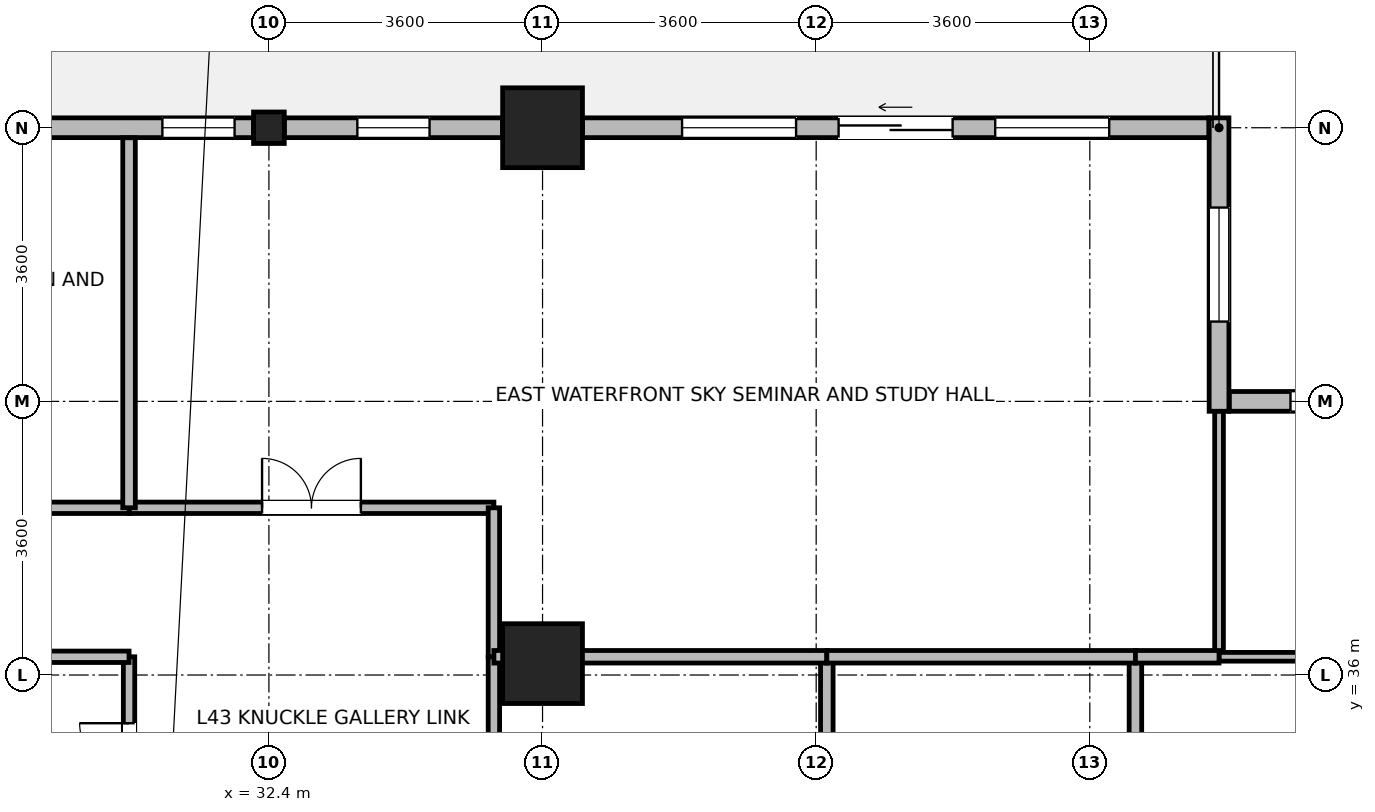
"""IFC4 building model, lengths in metres.
Left out: names, types, materials, properties, quantities, classifications, styles, units other than length and angle.
Written with IfcOpenShell. Run it as: python <this file> out.ifc"""

import sys

from ifc_helpers import new_model, si_unit, direction, frame, frame_2d, origin, origin_2d, place, context, subcontext, project, spatial, rectangle, i_section, extrude, source, transform, mapped, element, fill, save


model = new_model("IFC4")
c1 = context("Model", 3, precision=1e-05, world=origin(), true_north=direction((0.0, 1.0)))
c2 = subcontext(c1, "Body", "Model", "MODEL_VIEW")
j1 = project(units=[si_unit("LENGTHUNIT", "METRE"), si_unit("PLANEANGLEUNIT", "RADIAN")], contexts=[c1])
p1 = place(None, origin())
s1 = spatial("IfcSite", under=j1, at=p1, CompositionType="ELEMENT")
p2 = place(p1, origin())
s2 = spatial("IfcBuilding", under=s1, at=p2, CompositionType="ELEMENT")
p3 = place(p2, frame((0.0, 0.0, 169.8)))
s3 = spatial("IfcBuildingStorey", under=s2, at=p3, CompositionType="ELEMENT", Elevation=169.8)
m1 = source(origin(), c2, "Body", "SweptSolid", [
    extrude(rectangle(XDim=1.05, YDim=1.05, at=origin_2d()), origin(), (0.0, 0.0, 1.0), 3.7),
])
for number, where, z_axis, x_axis in (
    (1, (36.0, 43.2, 0.0), (0.0, 0.0, 1.0), (1.0, 0.0, 0.0)),
    (2, (36.0, 36.15, 0.0), (0.0, 0.0, 1.0), (1.0, 0.0, 0.0)),
):
    element("IfcColumn", number, at=place(p3, frame(where, z_axis=z_axis, x_axis=x_axis)), inside=s3, PredefinedType="COLUMN", context=c2, shape_type="MappedRepresentation", body=[
        mapped(m1, transform((0.0, 0.0, 0.0), x_axis=(1.0, 0.0, 0.0), y_axis=(0.0, 1.0, 0.0), z_axis=(0.0, 0.0, 1.0), scale=1.0)),
    ])
m2 = source(origin(), c2, "Body", "SweptSolid", [
    extrude(i_section(OverallWidth=0.404, OverallDepth=0.414, WebThickness=0.021, FlangeThickness=0.028, FilletRadius=0.015, at=origin_2d()), origin(), (0.0, 0.0, 1.0), 3.7),
])
p4 = place(p3, frame((32.4, 43.2, 0.0), z_axis=(0.0, 0.0, 1.0), x_axis=(1.0, 0.0, 0.0)))
e3 = element("IfcColumn", 3, at=p4, inside=s3, PredefinedType="COLUMN", context=c2, shape_type="MappedRepresentation", body=[
    mapped(m2, transform((0.0, 0.0, 0.0), x_axis=(1.0, 0.0, 0.0), y_axis=(0.0, 1.0, 0.0), z_axis=(0.0, 0.0, 1.0), scale=1.0)),
])
p5 = place(p3, frame((45.035, 39.6, 0.0), z_axis=(0.0, 0.0, 1.0), x_axis=(1.0, 0.0, 0.0)))
e4 = element("IfcWall", 4, at=p5, inside=s3, PredefinedType="STANDARD", context=c2, shape_type="SweptSolid", body=[
    extrude(rectangle(XDim=9.33, YDim=0.26, at=frame_2d((4.665, 0.0))), origin(), (0.0, 0.0, 1.0), 3.44),
])
p6 = place(p5, frame((0.805, 0.0, 0.85)))
e5 = element("IfcOpeningElement", 5, at=p6, cuts=e4, PredefinedType="OPENING", context=c2, shape_type="SweptSolid", body=[
    extrude(rectangle(XDim=1.5, YDim=1.85, at=frame_2d((0.75, 0.925))), frame((0.0, 0.14, 0.0), z_axis=(0.0, -1.0, 0.0), x_axis=(1.0, 0.0, 0.0)), (0.0, 0.0, 1.0), 0.28),
])
p7 = place(p5, frame((3.915, 0.0, 0.85)))
e6 = element("IfcOpeningElement", 6, at=p7, cuts=e4, PredefinedType="OPENING", context=c2, shape_type="SweptSolid", body=[
    extrude(rectangle(XDim=1.5, YDim=1.85, at=frame_2d((0.75, 0.925))), frame((0.0, 0.14, 0.0), z_axis=(0.0, -1.0, 0.0), x_axis=(1.0, 0.0, 0.0)), (0.0, 0.0, 1.0), 0.28),
])
p8 = place(p5, frame((7.025, 0.0, 0.85)))
e7 = element("IfcOpeningElement", 7, at=p8, cuts=e4, PredefinedType="OPENING", context=c2, shape_type="SweptSolid", body=[
    extrude(rectangle(XDim=1.5, YDim=1.85, at=frame_2d((0.75, 0.925))), frame((0.0, 0.14, 0.0), z_axis=(0.0, -1.0, 0.0), x_axis=(1.0, 0.0, 0.0)), (0.0, 0.0, 1.0), 0.28),
])
p9 = place(p3, frame((44.9, 43.33, 0.0), z_axis=(0.0, 0.0, 1.0), x_axis=(0.0, -1.0, 0.0)))
e8 = element("IfcWall", 8, at=p9, inside=s3, PredefinedType="STANDARD", context=c2, shape_type="SweptSolid", body=[
    extrude(rectangle(XDim=3.86, YDim=0.26, at=frame_2d((1.93, 0.0))), origin(), (0.0, 0.0, 1.0), 3.44),
])
p10 = place(p9, frame((1.18, 0.0, 0.85)))
e9 = element("IfcOpeningElement", 9, at=p10, cuts=e8, PredefinedType="OPENING", context=c2, shape_type="SweptSolid", body=[
    extrude(rectangle(XDim=1.5, YDim=1.85, at=frame_2d((0.75, 0.925))), frame((0.0, 0.14, 0.0), z_axis=(0.0, -1.0, 0.0), x_axis=(1.0, 0.0, 0.0)), (0.0, 0.0, 1.0), 0.28),
])
p11 = place(p3, frame((36.526, 43.2, 0.0), z_axis=(0.0, 0.0, 1.0), x_axis=(1.0, 0.0, 0.0)))
e10 = element("IfcWall", 10, at=p11, inside=s3, PredefinedType="STANDARD", context=c2, shape_type="SweptSolid", body=[
    extrude(rectangle(XDim=8.239, YDim=0.26, at=frame_2d((4.12, 0.0))), origin(), (0.0, 0.0, 1.0), 2.99),
])
p12 = place(p11, frame((3.369, 0.0, 0.0)))
e11 = element("IfcOpeningElement", 11, at=p12, cuts=e10, PredefinedType="OPENING", context=c2, shape_type="SweptSolid", body=[
    extrude(rectangle(XDim=1.5, YDim=2.15, at=frame_2d((0.75, 1.075))), frame((0.0, 0.14, 0.0), z_axis=(0.0, -1.0, 0.0), x_axis=(1.0, 0.0, 0.0)), (0.0, 0.0, 1.0), 0.28),
])
p13 = place(p11, frame((1.31, 0.0, 0.85)))
e12 = element("IfcOpeningElement", 12, at=p13, cuts=e10, PredefinedType="OPENING", context=c2, shape_type="SweptSolid", body=[
    extrude(rectangle(XDim=1.5, YDim=1.85, at=frame_2d((0.75, 0.925))), frame((0.0, 0.14, 0.0), z_axis=(0.0, -1.0, 0.0), x_axis=(1.0, 0.0, 0.0)), (0.0, 0.0, 1.0), 0.28),
])
p14 = place(p11, frame((5.429, 0.0, 0.85)))
e13 = element("IfcOpeningElement", 13, at=p14, cuts=e10, PredefinedType="OPENING", context=c2, shape_type="SweptSolid", body=[
    extrude(rectangle(XDim=1.5, YDim=1.85, at=frame_2d((0.75, 0.925))), frame((0.0, 0.14, 0.0), z_axis=(0.0, -1.0, 0.0), x_axis=(1.0, 0.0, 0.0)), (0.0, 0.0, 1.0), 0.28),
])
p15 = place(p3, frame((32.603, 43.2, 0.0), z_axis=(0.0, 0.0, 1.0), x_axis=(1.0, 0.0, 0.0)))
e14 = element("IfcWall", 14, at=p15, inside=s3, PredefinedType="STANDARD", context=c2, shape_type="SweptSolid", body=[
    extrude(rectangle(XDim=2.871, YDim=0.26, at=frame_2d((1.436, 0.0))), origin(), (0.0, 0.0, 1.0), 2.99),
])
p16 = place(p15, frame((0.96, 0.0, 0.85)))
e15 = element("IfcOpeningElement", 15, at=p16, cuts=e14, PredefinedType="OPENING", context=c2, shape_type="SweptSolid", body=[
    extrude(rectangle(XDim=0.95, YDim=1.75, at=frame_2d((0.475, 0.875))), frame((0.0, 0.14, 0.0), z_axis=(0.0, -1.0, 0.0), x_axis=(1.0, 0.0, 0.0)), (0.0, 0.0, 1.0), 0.28),
])
p17 = place(p3, frame((29.326, 43.2, 0.0), z_axis=(0.0, 0.0, 1.0), x_axis=(1.0, 0.0, 0.0)))
e16 = element("IfcWall", 16, at=p17, inside=s3, PredefinedType="STANDARD", context=c2, shape_type="SweptSolid", body=[
    extrude(rectangle(XDim=2.871, YDim=0.26, at=frame_2d((1.436, 0.0))), origin(), (0.0, 0.0, 1.0), 2.99),
])
p18 = place(p17, frame((1.673, 0.0, 0.85)))
e17 = element("IfcOpeningElement", 17, at=p18, cuts=e16, PredefinedType="OPENING", context=c2, shape_type="SweptSolid", body=[
    extrude(rectangle(XDim=0.95, YDim=1.75, at=frame_2d((0.475, 0.875))), frame((0.0, 0.14, 0.0), z_axis=(0.0, -1.0, 0.0), x_axis=(1.0, 0.0, 0.0)), (0.0, 0.0, 1.0), 0.28),
])
p19 = place(p3, frame((35.36, 28.56, 0.0), z_axis=(0.0, 0.0, 1.0), x_axis=(0.0, 1.0, 0.0)))
e18 = element("IfcWall", 18, at=p19, inside=s3, PredefinedType="PARTITIONING", context=c2, shape_type="SweptSolid", body=[
    extrude(rectangle(XDim=7.68, YDim=0.15, at=frame_2d((3.84, 0.0))), origin(), (0.0, 0.0, 1.0), 3.44),
])
p20 = place(p19, frame((3.19, 0.0, 0.0)))
e19 = element("IfcOpeningElement", 19, at=p20, cuts=e18, PredefinedType="OPENING", context=c2, shape_type="SweptSolid", body=[
    extrude(rectangle(XDim=1.3, YDim=2.12, at=frame_2d((0.65, 1.06))), frame((0.0, 0.085, 0.0), z_axis=(0.0, -1.0, 0.0), x_axis=(1.0, 0.0, 0.0)), (0.0, 0.0, 1.0), 0.17),
])
p21 = place(p3, frame((30.56, 38.2, 0.0), z_axis=(0.0, 0.0, 1.0), x_axis=(1.0, 0.0, 0.0)))
e20 = element("IfcWall", 20, at=p21, inside=s3, PredefinedType="PARTITIONING", context=c2, shape_type="SweptSolid", body=[
    extrude(rectangle(XDim=4.8, YDim=0.15, at=frame_2d((2.4, 0.0))), origin(), (0.0, 0.0, 1.0), 3.44),
])
p22 = place(p21, frame((1.75, 0.0, 0.0)))
e21 = element("IfcOpeningElement", 21, at=p22, cuts=e20, PredefinedType="OPENING", context=c2, shape_type="SweptSolid", body=[
    extrude(rectangle(XDim=1.3, YDim=2.12, at=frame_2d((0.65, 1.06))), frame((0.0, 0.085, 0.0), z_axis=(0.0, -1.0, 0.0), x_axis=(1.0, 0.0, 0.0)), (0.0, 0.0, 1.0), 0.17),
])
p23 = place(p3, frame((25.82, 38.2, 0.0), z_axis=(0.0, 0.0, 1.0), x_axis=(1.0, 0.0, 0.0)))
e22 = element("IfcWall", 22, at=p23, inside=s3, PredefinedType="PARTITIONING", context=c2, shape_type="SweptSolid", body=[
    extrude(rectangle(XDim=4.74, YDim=0.15, at=frame_2d((2.37, 0.0))), origin(), (0.0, 0.0, 1.0), 3.44),
])
p24 = place(p23, frame((1.92, 0.0, 0.0)))
e23 = element("IfcOpeningElement", 23, at=p24, cuts=e22, PredefinedType="OPENING", context=c2, shape_type="SweptSolid", body=[
    extrude(rectangle(XDim=0.9, YDim=2.08, at=frame_2d((0.45, 1.04))), frame((0.0, 0.085, 0.0), z_axis=(0.0, -1.0, 0.0), x_axis=(1.0, 0.0, 0.0)), (0.0, 0.0, 1.0), 0.17),
])
p25 = place(p3, frame((30.56, 33.7, 0.0), z_axis=(0.0, 0.0, 1.0), x_axis=(0.0, 1.0, 0.0)))
e24 = element("IfcWall", 24, at=p25, inside=s3, PredefinedType="PARTITIONING", context=c2, shape_type="SweptSolid", body=[
    extrude(rectangle(XDim=2.54, YDim=0.15, at=frame_2d((1.27, 0.0))), origin(), (0.0, 0.0, 1.0), 3.44),
])
p26 = place(p25, frame((0.366, 0.0, 0.0)))
e25 = element("IfcOpeningElement", 25, at=p26, cuts=e24, PredefinedType="OPENING", context=c2, shape_type="SweptSolid", body=[
    extrude(rectangle(XDim=1.3, YDim=2.12, at=frame_2d((0.65, 1.06))), frame((0.0, 0.085, 0.0), z_axis=(0.0, -1.0, 0.0), x_axis=(1.0, 0.0, 0.0)), (0.0, 0.0, 1.0), 0.17),
])
p27 = place(p3, frame((35.36, 36.24, 0.0), z_axis=(0.0, 0.0, 1.0), x_axis=(0.0, 1.0, 0.0)))
e26 = element("IfcWall", 26, at=p27, inside=s3, PredefinedType="PARTITIONING", context=c2, shape_type="SweptSolid", body=[
    extrude(rectangle(XDim=1.96, YDim=0.15, at=frame_2d((0.98, 0.0))), origin(), (0.0, 0.0, 1.0), 3.44),
])
p28 = place(p3, frame((29.325, 36.24, 0.0), z_axis=(0.0, 0.0, 1.0), x_axis=(1.0, 0.0, 0.0)))
e27 = element("IfcWall", 27, at=p28, inside=s3, PredefinedType="PARTITIONING", context=c2, shape_type="SweptSolid", body=[
    extrude(rectangle(XDim=1.235, YDim=0.15, at=frame_2d((0.618, 0.0))), origin(), (0.0, 0.0, 1.0), 2.84),
])
for number, where, z_axis, x_axis in (
    (28, (39.74, 28.56, 0.0), (0.0, 0.0, 1.0), (0.0, 1.0, 0.0)),
    (29, (43.8, 28.56, 0.0), (0.0, 0.0, 1.0), (0.0, 1.0, 0.0)),
):
    element("IfcWall", number, at=place(p3, frame(where, z_axis=z_axis, x_axis=x_axis)), inside=s3, PredefinedType="PARTITIONING", context=c2, shape_type="SweptSolid", body=[
        extrude(rectangle(XDim=7.68, YDim=0.165, at=frame_2d((3.84, 0.0))), origin(), (0.0, 0.0, 1.0), 3.44),
    ])
p29 = place(p3, frame((44.9, 36.24, 0.0), z_axis=(0.0, 0.0, 1.0), x_axis=(0.0, 1.0, 0.0)))
e30 = element("IfcWall", 30, at=p29, inside=s3, PredefinedType="PARTITIONING", context=c2, shape_type="SweptSolid", body=[
    extrude(rectangle(XDim=3.228, YDim=0.115, at=frame_2d((1.614, 0.0))), origin(), (0.0, 0.0, 1.0), 3.44),
])
p30 = place(p3, frame((30.56, 38.2, 0.0), z_axis=(0.0, 0.0, 1.0), x_axis=(0.0, 1.0, 0.0)))
e31 = element("IfcWall", 31, at=p30, inside=s3, PredefinedType="PARTITIONING", context=c2, shape_type="SweptSolid", body=[
    extrude(rectangle(XDim=4.868, YDim=0.165, at=frame_2d((2.434, 0.0))), origin(), (0.0, 0.0, 1.0), 3.44),
])
p31 = place(p3, frame((35.36, 36.24, 0.0), z_axis=(0.0, 0.0, 1.0), x_axis=(1.0, 0.0, 0.0)))
e32 = element("IfcWall", 32, at=p31, inside=s3, PredefinedType="PARTITIONING", context=c2, shape_type="SweptSolid", body=[
    extrude(rectangle(XDim=4.38, YDim=0.165, at=frame_2d((2.19, 0.0))), origin(), (0.0, 0.0, 1.0), 2.84),
])
p32 = place(p3, frame((39.74, 36.24, 0.0), z_axis=(0.0, 0.0, 1.0), x_axis=(1.0, 0.0, 0.0)))
e33 = element("IfcWall", 33, at=p32, inside=s3, PredefinedType="PARTITIONING", context=c2, shape_type="SweptSolid", body=[
    extrude(rectangle(XDim=4.06, YDim=0.165, at=frame_2d((2.03, 0.0))), origin(), (0.0, 0.0, 1.0), 2.84),
])
p33 = place(p3, frame((44.9, 36.24, 0.0), z_axis=(0.0, 0.0, 1.0), x_axis=(1.0, 0.0, 0.0)))
e34 = element("IfcWall", 34, at=p33, inside=s3, PredefinedType="PARTITIONING", context=c2, shape_type="SweptSolid", body=[
    extrude(rectangle(XDim=1.375, YDim=0.115, at=frame_2d((0.688, 0.0))), origin(), (0.0, 0.0, 1.0), 2.84),
])
p34 = place(p3, frame((43.8, 36.24, 0.0), z_axis=(0.0, 0.0, 1.0), x_axis=(1.0, 0.0, 0.0)))
e35 = element("IfcWall", 35, at=p34, inside=s3, PredefinedType="PARTITIONING", context=c2, shape_type="SweptSolid", body=[
    extrude(rectangle(XDim=1.1, YDim=0.165, at=frame_2d((0.55, 0.0))), origin(), (0.0, 0.0, 1.0), 2.84),
])
p35 = place(p6, origin())
e36 = element("IfcWindow", 36, at=p35, inside=s3, PartitioningType="SINGLE_PANEL", PredefinedType="WINDOW", context=c2, shape_type="SweptSolid", body=[
    extrude(rectangle(XDim=1.5, YDim=1.85, at=frame_2d((0.75, 0.925))), frame((0.0, 0.03, 0.0), z_axis=(0.0, -1.0, 0.0), x_axis=(1.0, 0.0, 0.0)), (0.0, 0.0, 1.0), 0.06),
])
fill(e5, e36)
p36 = place(p10, origin())
e37 = element("IfcWindow", 37, at=p36, inside=s3, PartitioningType="SINGLE_PANEL", PredefinedType="WINDOW", context=c2, shape_type="SweptSolid", body=[
    extrude(rectangle(XDim=1.5, YDim=1.85, at=frame_2d((0.75, 0.925))), frame((0.0, 0.03, 0.0), z_axis=(0.0, -1.0, 0.0), x_axis=(1.0, 0.0, 0.0)), (0.0, 0.0, 1.0), 0.06),
])
fill(e9, e37)
p37 = place(p12, origin())
e38 = element("IfcDoor", 38, at=p37, inside=s3, OperationType="SLIDING_TO_LEFT", PredefinedType="DOOR", context=c2, shape_type="SweptSolid", body=[
    extrude(rectangle(XDim=1.5, YDim=2.15, at=frame_2d((0.75, 1.075))), frame((0.0, 0.025, 0.0), z_axis=(0.0, -1.0, 0.0), x_axis=(1.0, 0.0, 0.0)), (0.0, 0.0, 1.0), 0.05),
])
fill(e11, e38)
p38 = place(p13, origin())
e39 = element("IfcWindow", 39, at=p38, inside=s3, PartitioningType="SINGLE_PANEL", PredefinedType="WINDOW", context=c2, shape_type="SweptSolid", body=[
    extrude(rectangle(XDim=1.5, YDim=1.85, at=frame_2d((0.75, 0.925))), frame((0.0, 0.03, 0.0), z_axis=(0.0, -1.0, 0.0), x_axis=(1.0, 0.0, 0.0)), (0.0, 0.0, 1.0), 0.06),
])
fill(e12, e39)
p39 = place(p14, origin())
e40 = element("IfcWindow", 40, at=p39, inside=s3, PartitioningType="SINGLE_PANEL", PredefinedType="WINDOW", context=c2, shape_type="SweptSolid", body=[
    extrude(rectangle(XDim=1.5, YDim=1.85, at=frame_2d((0.75, 0.925))), frame((0.0, 0.03, 0.0), z_axis=(0.0, -1.0, 0.0), x_axis=(1.0, 0.0, 0.0)), (0.0, 0.0, 1.0), 0.06),
])
fill(e13, e40)
p40 = place(p16, origin())
e41 = element("IfcWindow", 41, at=p40, inside=s3, PartitioningType="SINGLE_PANEL", PredefinedType="WINDOW", context=c2, shape_type="SweptSolid", body=[
    extrude(rectangle(XDim=0.95, YDim=1.75, at=frame_2d((0.475, 0.875))), frame((0.0, 0.03, 0.0), z_axis=(0.0, -1.0, 0.0), x_axis=(1.0, 0.0, 0.0)), (0.0, 0.0, 1.0), 0.06),
])
fill(e15, e41)
p41 = place(p18, origin())
e42 = element("IfcWindow", 42, at=p41, inside=s3, PartitioningType="SINGLE_PANEL", PredefinedType="WINDOW", context=c2, shape_type="SweptSolid", body=[
    extrude(rectangle(XDim=0.95, YDim=1.75, at=frame_2d((0.475, 0.875))), frame((0.0, 0.03, 0.0), z_axis=(0.0, -1.0, 0.0), x_axis=(1.0, 0.0, 0.0)), (0.0, 0.0, 1.0), 0.06),
])
fill(e17, e42)
p42 = place(p22, origin())
e43 = element("IfcDoor", 43, at=p42, inside=s3, OperationType="DOUBLE_DOOR_SINGLE_SWING", PredefinedType="DOOR", context=c2, shape_type="SweptSolid", body=[
    extrude(rectangle(XDim=1.3, YDim=2.12, at=frame_2d((0.65, 1.06))), frame((0.0, 0.025, 0.0), z_axis=(0.0, -1.0, 0.0), x_axis=(1.0, 0.0, 0.0)), (0.0, 0.0, 1.0), 0.05),
])
fill(e21, e43)
p43 = place(p26, origin())
e44 = element("IfcDoor", 44, at=p43, inside=s3, OperationType="DOUBLE_DOOR_SINGLE_SWING", PredefinedType="DOOR", context=c2, shape_type="SweptSolid", body=[
    extrude(rectangle(XDim=1.3, YDim=2.12, at=frame_2d((0.65, 1.06))), frame((0.0, 0.025, 0.0), z_axis=(0.0, -1.0, 0.0), x_axis=(1.0, 0.0, 0.0)), (0.0, 0.0, 1.0), 0.05),
])
fill(e25, e44)
save(model, sys.argv[1])
